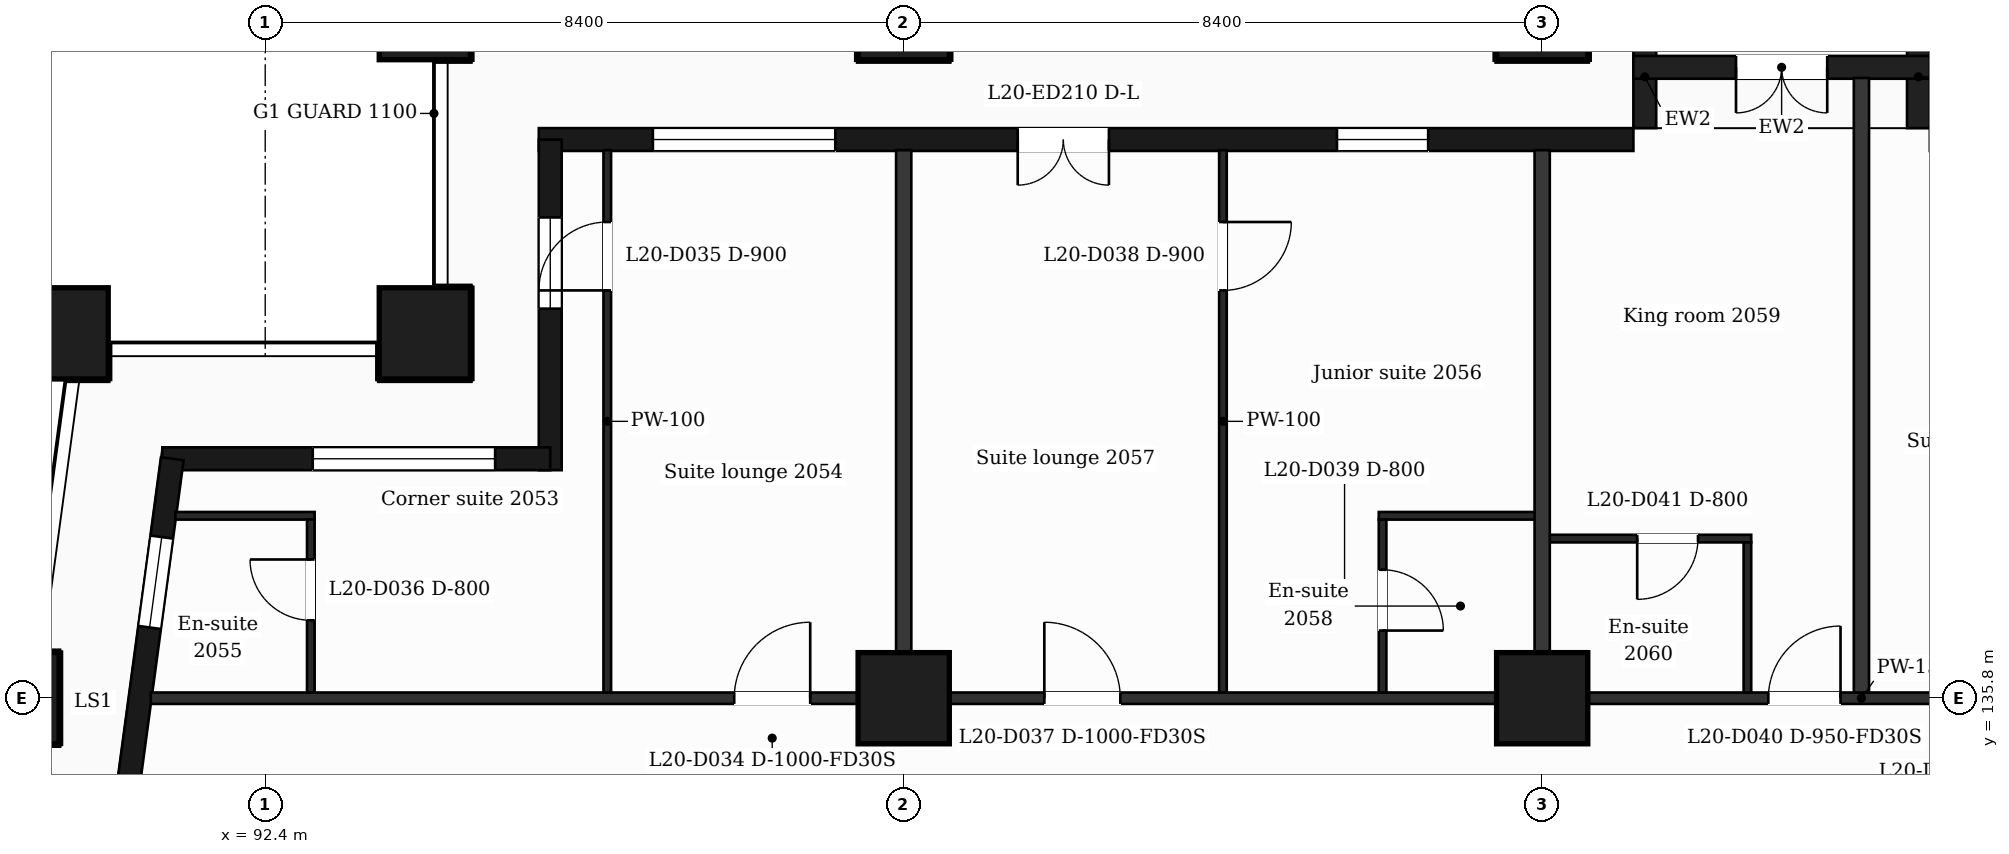
"""IFC4 building model, lengths in metres.
Left out: names, types, materials, properties, quantities, classifications, styles, units other than length and angle.
Written with IfcOpenShell. Run it as: python <this file> out.ifc"""

import sys

from ifc_helpers import new_model, si_unit, direction, frame, frame_2d, origin, origin_2d, place, context, subcontext, project, spatial, rectangle, extrude, element, fill, save


model = new_model("IFC4")
c1 = context("Model", 3, precision=1e-05, world=origin(), true_north=direction((0.0, 1.0)))
c2 = subcontext(c1, "Body", "Model", "MODEL_VIEW")
j1 = project(units=[si_unit("LENGTHUNIT", "METRE"), si_unit("PLANEANGLEUNIT", "RADIAN")], contexts=[c1])
p1 = place(None, origin())
s1 = spatial("IfcSite", under=j1, at=p1, CompositionType="ELEMENT")
p2 = place(p1, origin())
s2 = spatial("IfcBuilding", under=s1, at=p2, CompositionType="ELEMENT")
p3 = place(p2, frame((0.0, 0.0, 91.0)))
s3 = spatial("IfcBuildingStorey", under=s2, at=p3, CompositionType="ELEMENT", Elevation=91.0)
for number, where, z_axis, x_axis in (
    (1, (94.5, 140.6, 0.0), (0.0, 0.0, 1.0), (1.0, 0.0, 0.0)),
    (2, (89.735, 140.6, 0.0), (0.0, 0.0, 1.0), (1.0, 0.0, 0.0)),
    (3, (100.8, 135.8, 0.0), (0.0, 0.0, 1.0), (1.0, 0.0, 0.0)),
    (4, (109.2, 135.8, 0.0), (0.0, 0.0, 1.0), (1.0, 0.0, 0.0)),
    (5, (89.088, 135.8, 0.0), (0.0, 0.0, 1.0), (1.0, 0.0, 0.0)),
    (6, (100.8, 144.8, 0.0), (0.0, 0.0, 1.0), (1.0, 0.0, 0.0)),
    (7, (109.2, 144.8, 0.0), (0.0, 0.0, 1.0), (1.0, 0.0, 0.0)),
    (8, (94.5, 144.8, 0.0), (0.0, 0.0, 1.0), (1.0, 0.0, 0.0)),
):
    element("IfcColumn", number, at=place(p3, frame(where, z_axis=z_axis, x_axis=x_axis)), inside=s3, PredefinedType="COLUMN", context=c2, shape_type="SweptSolid", body=[
        extrude(rectangle(XDim=1.2, YDim=1.2, at=origin_2d()), origin(), (0.0, 0.0, 1.0), 3.7),
    ])
p4 = place(p3, frame((110.4, 143.15, 0.0), z_axis=(0.0, 0.0, 1.0), x_axis=(-1.0, 0.0, 0.0)))
e9 = element("IfcWall", 9, at=p4, inside=s3, PredefinedType="SOLIDWALL", context=c2, shape_type="SweptSolid", body=[
    extrude(rectangle(XDim=14.4, YDim=0.3, at=frame_2d((7.2, 0.0))), origin(), (0.0, 0.0, 1.0), 3.38),
])
p5 = place(p4, frame((2.7, 0.0, 0.9)))
e10 = element("IfcOpeningElement", 10, at=p5, cuts=e9, PredefinedType="OPENING", context=c2, shape_type="SweptSolid", body=[
    extrude(rectangle(XDim=1.2, YDim=2.1, at=frame_2d((0.6, 1.05))), frame((0.0, 0.16, 0.0), z_axis=(0.0, -1.0, 0.0), x_axis=(1.0, 0.0, 0.0)), (0.0, 0.0, 1.0), 0.32),
])
p6 = place(p4, frame((6.9, 0.0, 0.0)))
e11 = element("IfcOpeningElement", 11, at=p6, cuts=e9, PredefinedType="OPENING", context=c2, shape_type="SweptSolid", body=[
    extrude(rectangle(XDim=1.2, YDim=2.4, at=frame_2d((0.6, 1.2))), frame((0.0, 0.16, 0.0), z_axis=(0.0, -1.0, 0.0), x_axis=(1.0, 0.0, 0.0)), (0.0, 0.0, 1.0), 0.32),
])
p7 = place(p4, frame((10.5, 0.0, 0.9)))
e12 = element("IfcOpeningElement", 12, at=p7, cuts=e9, PredefinedType="OPENING", context=c2, shape_type="SweptSolid", body=[
    extrude(rectangle(XDim=2.4, YDim=2.1, at=frame_2d((1.2, 1.05))), frame((0.0, 0.16, 0.0), z_axis=(0.0, -1.0, 0.0), x_axis=(1.0, 0.0, 0.0)), (0.0, 0.0, 1.0), 0.32),
])
for number, where, z_axis, x_axis in (
    (13, (114.15, 143.3, 0.0), (0.0, 0.0, 1.0), (0.0, 1.0, 0.0)),
    (14, (110.55, 143.3, 0.0), (0.0, 0.0, 1.0), (0.0, 1.0, 0.0)),
):
    element("IfcWall", number, at=place(p3, frame(where, z_axis=z_axis, x_axis=x_axis)), inside=s3, PredefinedType="SOLIDWALL", context=c2, shape_type="SweptSolid", body=[
        extrude(rectangle(XDim=1.35, YDim=0.3, at=frame_2d((0.675, 0.0))), origin(), (0.0, 0.0, 1.0), 3.38),
    ])
p8 = place(p3, frame((114.3, 144.1, 0.0), z_axis=(0.0, 0.0, 1.0), x_axis=(-1.0, 0.0, 0.0)))
e15 = element("IfcWall", 15, at=p8, inside=s3, PredefinedType="SOLIDWALL", context=c2, shape_type="SweptSolid", body=[
    extrude(rectangle(XDim=3.9, YDim=0.3, at=frame_2d((1.95, 0.0))), origin(), (0.0, 0.0, 1.0), 3.38),
])
p9 = place(p8, frame((1.35, 0.0, 0.0)))
e16 = element("IfcOpeningElement", 16, at=p9, cuts=e15, PredefinedType="OPENING", context=c2, shape_type="SweptSolid", body=[
    extrude(rectangle(XDim=1.2, YDim=2.4, at=frame_2d((0.6, 1.2))), frame((0.0, 0.16, 0.0), z_axis=(0.0, -1.0, 0.0), x_axis=(1.0, 0.0, 0.0)), (0.0, 0.0, 1.0), 0.32),
])
p10 = place(p3, frame((96.15, 143.15, 0.0), z_axis=(0.0, 0.0, 1.0), x_axis=(0.0, -1.0, 0.0)))
e17 = element("IfcWall", 17, at=p10, inside=s3, PredefinedType="SOLIDWALL", context=c2, shape_type="SweptSolid", body=[
    extrude(rectangle(XDim=4.35, YDim=0.3, at=frame_2d((2.175, 0.0))), origin(), (0.0, 0.0, 1.0), 3.38),
])
p11 = place(p10, frame((1.025, 0.0, 0.9)))
e18 = element("IfcOpeningElement", 18, at=p11, cuts=e17, PredefinedType="OPENING", context=c2, shape_type="SweptSolid", body=[
    extrude(rectangle(XDim=1.2, YDim=2.1, at=frame_2d((0.6, 1.05))), frame((0.0, 0.16, 0.0), z_axis=(0.0, -1.0, 0.0), x_axis=(1.0, 0.0, 0.0)), (0.0, 0.0, 1.0), 0.32),
])
p12 = place(p3, frame((96.15, 138.95, 0.0), z_axis=(0.0, 0.0, 1.0), x_axis=(-1.0, 0.0, 0.0)))
e19 = element("IfcWall", 19, at=p12, inside=s3, PredefinedType="SOLIDWALL", context=c2, shape_type="SweptSolid", body=[
    extrude(rectangle(XDim=5.104, YDim=0.3, at=frame_2d((2.552, 0.0))), origin(), (0.0, 0.0, 1.0), 3.38),
])
p13 = place(p12, frame((0.725, 0.0, 0.9)))
e20 = element("IfcOpeningElement", 20, at=p13, cuts=e19, PredefinedType="OPENING", context=c2, shape_type="SweptSolid", body=[
    extrude(rectangle(XDim=2.4, YDim=2.1, at=frame_2d((1.2, 1.05))), frame((0.0, 0.16, 0.0), z_axis=(0.0, -1.0, 0.0), x_axis=(1.0, 0.0, 0.0)), (0.0, 0.0, 1.0), 0.32),
])
p14 = place(p3, frame((91.177, 138.95, 0.0), z_axis=(0.0, 0.0, 1.0), x_axis=(-0.133426664613, -0.991058689065, 0.0)))
e21 = element("IfcWall", 21, at=p14, inside=s3, PredefinedType="SOLIDWALL", context=c2, shape_type="SweptSolid", body=[
    extrude(rectangle(XDim=6.609, YDim=0.3, at=frame_2d((3.305, 0.0))), origin(), (0.0, 0.0, 1.0), 3.38),
])
p15 = place(p14, frame((1.039, 0.0, 0.9)))
e22 = element("IfcOpeningElement", 22, at=p15, cuts=e21, PredefinedType="OPENING", context=c2, shape_type="SweptSolid", body=[
    extrude(rectangle(XDim=1.2, YDim=2.1, at=frame_2d((0.6, 1.05))), frame((0.0, 0.16, 0.0), z_axis=(0.0, -1.0, 0.0), x_axis=(1.0, 0.0, 0.0)), (0.0, 0.0, 1.0), 0.32),
])
p16 = place(p14, frame((4.294, 0.0, 0.0)))
e23 = element("IfcOpeningElement", 23, at=p16, cuts=e21, PredefinedType="OPENING", context=c2, shape_type="SweptSolid", body=[
    extrude(rectangle(XDim=1.2, YDim=2.4, at=frame_2d((0.6, 1.2))), frame((0.0, 0.16, 0.0), z_axis=(0.0, -1.0, 0.0), x_axis=(1.0, 0.0, 0.0)), (0.0, 0.0, 1.0), 0.32),
])
p17 = place(p3, frame((90.895, 135.8, 0.0), z_axis=(0.0, 0.0, 1.0), x_axis=(1.0, 0.0, 0.0)))
e24 = element("IfcWall", 24, at=p17, inside=s3, PredefinedType="PARTITIONING", context=c2, shape_type="SweptSolid", body=[
    extrude(rectangle(XDim=45.011, YDim=0.15, at=frame_2d((22.505, 0.0))), origin(), (0.0, 0.0, 1.0), 3.38),
])
p18 = place(p17, frame((7.675, 0.0, 0.0)))
e25 = element("IfcOpeningElement", 25, at=p18, cuts=e24, PredefinedType="OPENING", context=c2, shape_type="SweptSolid", body=[
    extrude(rectangle(XDim=1.0, YDim=2.1, at=frame_2d((0.5, 1.05))), frame((0.0, 0.085, 0.0), z_axis=(0.0, -1.0, 0.0), x_axis=(1.0, 0.0, 0.0)), (0.0, 0.0, 1.0), 0.17),
])
p19 = place(p17, frame((11.755, 0.0, 0.0)))
e26 = element("IfcOpeningElement", 26, at=p19, cuts=e24, PredefinedType="OPENING", context=c2, shape_type="SweptSolid", body=[
    extrude(rectangle(XDim=1.0, YDim=2.1, at=frame_2d((0.5, 1.05))), frame((0.0, 0.085, 0.0), z_axis=(0.0, -1.0, 0.0), x_axis=(1.0, 0.0, 0.0)), (0.0, 0.0, 1.0), 0.17),
])
p20 = place(p17, frame((21.281, 0.0, 0.0)))
e27 = element("IfcOpeningElement", 27, at=p20, cuts=e24, PredefinedType="OPENING", context=c2, shape_type="SweptSolid", body=[
    extrude(rectangle(XDim=0.95, YDim=2.1, at=frame_2d((0.475, 1.05))), frame((0.0, 0.085, 0.0), z_axis=(0.0, -1.0, 0.0), x_axis=(1.0, 0.0, 0.0)), (0.0, 0.0, 1.0), 0.17),
])
p21 = place(p17, frame((23.855, 0.0, 0.0)))
e28 = element("IfcOpeningElement", 28, at=p21, cuts=e24, PredefinedType="OPENING", context=c2, shape_type="SweptSolid", body=[
    extrude(rectangle(XDim=1.0, YDim=2.1, at=frame_2d((0.5, 1.05))), frame((0.0, 0.085, 0.0), z_axis=(0.0, -1.0, 0.0), x_axis=(1.0, 0.0, 0.0)), (0.0, 0.0, 1.0), 0.17),
])
p22 = place(p17, frame((33.285, 0.0, 0.0)))
e29 = element("IfcOpeningElement", 29, at=p22, cuts=e24, PredefinedType="OPENING", context=c2, shape_type="SweptSolid", body=[
    extrude(rectangle(XDim=1.0, YDim=2.1, at=frame_2d((0.5, 1.05))), frame((0.0, 0.085, 0.0), z_axis=(0.0, -1.0, 0.0), x_axis=(1.0, 0.0, 0.0)), (0.0, 0.0, 1.0), 0.17),
])
p23 = place(p17, frame((39.814, 0.0, 0.0)))
e30 = element("IfcOpeningElement", 30, at=p23, cuts=e24, PredefinedType="OPENING", context=c2, shape_type="SweptSolid", body=[
    extrude(rectangle(XDim=0.95, YDim=2.1, at=frame_2d((0.475, 1.05))), frame((0.0, 0.085, 0.0), z_axis=(0.0, -1.0, 0.0), x_axis=(1.0, 0.0, 0.0)), (0.0, 0.0, 1.0), 0.17),
])
p24 = place(p3, frame((109.2, 137.9, 0.0), z_axis=(0.0, 0.0, 1.0), x_axis=(1.0, 0.0, 0.0)))
e31 = element("IfcWall", 31, at=p24, inside=s3, PredefinedType="PARTITIONING", context=c2, shape_type="SweptSolid", body=[
    extrude(rectangle(XDim=2.75, YDim=0.1, at=frame_2d((1.375, 0.0))), origin(), (0.0, 0.0, 1.0), 3.38),
])
p25 = place(p24, frame((1.25, 0.0, 0.0)))
e32 = element("IfcOpeningElement", 32, at=p25, cuts=e31, PredefinedType="OPENING", context=c2, shape_type="SweptSolid", body=[
    extrude(rectangle(XDim=0.8, YDim=2.1, at=frame_2d((0.4, 1.05))), frame((0.0, 0.06, 0.0), z_axis=(0.0, -1.0, 0.0), x_axis=(1.0, 0.0, 0.0)), (0.0, 0.0, 1.0), 0.12),
])
p26 = place(p3, frame((91.218, 138.2, 0.0), z_axis=(0.0, 0.0, 1.0), x_axis=(1.0, 0.0, 0.0)))
e33 = element("IfcWall", 33, at=p26, inside=s3, PredefinedType="PARTITIONING", context=c2, shape_type="SweptSolid", body=[
    extrude(rectangle(XDim=1.832, YDim=0.1, at=frame_2d((0.916, 0.0))), origin(), (0.0, 0.0, 1.0), 3.38),
])
p27 = place(p3, frame((107.05, 138.2, 0.0), z_axis=(0.0, 0.0, 1.0), x_axis=(1.0, 0.0, 0.0)))
e34 = element("IfcWall", 34, at=p27, inside=s3, PredefinedType="PARTITIONING", context=c2, shape_type="SweptSolid", body=[
    extrude(rectangle(XDim=2.15, YDim=0.1, at=frame_2d((1.075, 0.0))), origin(), (0.0, 0.0, 1.0), 3.38),
])
p28 = place(p3, frame((93.0, 135.875, 0.0), z_axis=(0.0, 0.0, 1.0), x_axis=(0.0, 1.0, 0.0)))
e35 = element("IfcWall", 35, at=p28, inside=s3, PredefinedType="PARTITIONING", context=c2, shape_type="SweptSolid", body=[
    extrude(rectangle(XDim=2.275, YDim=0.1, at=frame_2d((1.137, 0.0))), origin(), (0.0, 0.0, 1.0), 3.38),
])
p29 = place(p28, frame((0.95, 0.0, 0.0)))
e36 = element("IfcOpeningElement", 36, at=p29, cuts=e35, PredefinedType="OPENING", context=c2, shape_type="SweptSolid", body=[
    extrude(rectangle(XDim=0.8, YDim=2.1, at=frame_2d((0.4, 1.05))), frame((0.0, 0.06, 0.0), z_axis=(0.0, -1.0, 0.0), x_axis=(1.0, 0.0, 0.0)), (0.0, 0.0, 1.0), 0.12),
])
p30 = place(p3, frame((96.9, 135.875, 0.0), z_axis=(0.0, 0.0, 1.0), x_axis=(0.0, 1.0, 0.0)))
e37 = element("IfcWall", 37, at=p30, inside=s3, PredefinedType="PARTITIONING", context=c2, shape_type="SweptSolid", body=[
    extrude(rectangle(XDim=7.135, YDim=0.1, at=frame_2d((3.567, 0.0))), origin(), (0.0, 0.0, 1.0), 3.38),
])
p31 = place(p30, frame((5.29, 0.0, 0.0)))
e38 = element("IfcOpeningElement", 38, at=p31, cuts=e37, PredefinedType="OPENING", context=c2, shape_type="SweptSolid", body=[
    extrude(rectangle(XDim=0.9, YDim=2.1, at=frame_2d((0.45, 1.05))), frame((0.0, 0.06, 0.0), z_axis=(0.0, -1.0, 0.0), x_axis=(1.0, 0.0, 0.0)), (0.0, 0.0, 1.0), 0.12),
])
p32 = place(p3, frame((100.8, 135.875, 0.0), z_axis=(0.0, 0.0, 1.0), x_axis=(0.0, 1.0, 0.0)))
e39 = element("IfcWall", 39, at=p32, inside=s3, PredefinedType="PARTITIONING", context=c2, shape_type="SweptSolid", body=[
    extrude(rectangle(XDim=7.135, YDim=0.2, at=frame_2d((3.567, 0.0))), origin(), (0.0, 0.0, 1.0), 3.38),
])
p33 = place(p3, frame((105.0, 135.875, 0.0), z_axis=(0.0, 0.0, 1.0), x_axis=(0.0, 1.0, 0.0)))
e40 = element("IfcWall", 40, at=p33, inside=s3, PredefinedType="PARTITIONING", context=c2, shape_type="SweptSolid", body=[
    extrude(rectangle(XDim=7.135, YDim=0.1, at=frame_2d((3.567, 0.0))), origin(), (0.0, 0.0, 1.0), 3.38),
])
p34 = place(p33, frame((5.29, 0.0, 0.0)))
e41 = element("IfcOpeningElement", 41, at=p34, cuts=e40, PredefinedType="OPENING", context=c2, shape_type="SweptSolid", body=[
    extrude(rectangle(XDim=0.9, YDim=2.1, at=frame_2d((0.45, 1.05))), frame((0.0, 0.06, 0.0), z_axis=(0.0, -1.0, 0.0), x_axis=(1.0, 0.0, 0.0)), (0.0, 0.0, 1.0), 0.12),
])
p35 = place(p3, frame((107.1, 135.875, 0.0), z_axis=(0.0, 0.0, 1.0), x_axis=(0.0, 1.0, 0.0)))
e42 = element("IfcWall", 42, at=p35, inside=s3, PredefinedType="PARTITIONING", context=c2, shape_type="SweptSolid", body=[
    extrude(rectangle(XDim=2.275, YDim=0.1, at=frame_2d((1.137, 0.0))), origin(), (0.0, 0.0, 1.0), 3.38),
])
p36 = place(p35, frame((0.815, 0.0, 0.0)))
e43 = element("IfcOpeningElement", 43, at=p36, cuts=e42, PredefinedType="OPENING", context=c2, shape_type="SweptSolid", body=[
    extrude(rectangle(XDim=0.8, YDim=2.1, at=frame_2d((0.4, 1.05))), frame((0.0, 0.06, 0.0), z_axis=(0.0, -1.0, 0.0), x_axis=(1.0, 0.0, 0.0)), (0.0, 0.0, 1.0), 0.12),
])
p37 = place(p3, frame((109.2, 135.875, 0.0), z_axis=(0.0, 0.0, 1.0), x_axis=(0.0, 1.0, 0.0)))
e44 = element("IfcWall", 44, at=p37, inside=s3, PredefinedType="PARTITIONING", context=c2, shape_type="SweptSolid", body=[
    extrude(rectangle(XDim=7.135, YDim=0.2, at=frame_2d((3.567, 0.0))), origin(), (0.0, 0.0, 1.0), 3.38),
])
p38 = place(p3, frame((111.9, 135.875, 0.0), z_axis=(0.0, 0.0, 1.0), x_axis=(0.0, 1.0, 0.0)))
e45 = element("IfcWall", 45, at=p38, inside=s3, PredefinedType="PARTITIONING", context=c2, shape_type="SweptSolid", body=[
    extrude(rectangle(XDim=1.975, YDim=0.1, at=frame_2d((0.988, 0.0))), origin(), (0.0, 0.0, 1.0), 3.38),
])
p39 = place(p3, frame((113.4, 135.875, 0.0), z_axis=(0.0, 0.0, 1.0), x_axis=(0.0, 1.0, 0.0)))
e46 = element("IfcWall", 46, at=p39, inside=s3, PredefinedType="PARTITIONING", context=c2, shape_type="SweptSolid", body=[
    extrude(rectangle(XDim=8.085, YDim=0.2, at=frame_2d((4.042, 0.0))), origin(), (0.0, 0.0, 1.0), 3.38),
])
p40 = place(p5, origin())
e47 = element("IfcWindow", 47, at=p40, inside=s3, PartitioningType="SINGLE_PANEL", PredefinedType="WINDOW", context=c2, shape_type="SweptSolid", body=[
    extrude(rectangle(XDim=1.2, YDim=2.1, at=frame_2d((0.6, 1.05))), frame((0.0, 0.03, 0.0), z_axis=(0.0, -1.0, 0.0), x_axis=(1.0, 0.0, 0.0)), (0.0, 0.0, 1.0), 0.06),
])
fill(e10, e47)
p41 = place(p6, origin())
e48 = element("IfcDoor", 48, at=p41, inside=s3, OperationType="DOUBLE_DOOR_SINGLE_SWING", PredefinedType="DOOR", context=c2, shape_type="SweptSolid", body=[
    extrude(rectangle(XDim=1.2, YDim=2.4, at=frame_2d((0.6, 1.2))), frame((0.0, 0.025, 0.0), z_axis=(0.0, -1.0, 0.0), x_axis=(1.0, 0.0, 0.0)), (0.0, 0.0, 1.0), 0.05),
])
fill(e11, e48)
p42 = place(p7, origin())
e49 = element("IfcWindow", 49, at=p42, inside=s3, PartitioningType="SINGLE_PANEL", PredefinedType="WINDOW", context=c2, shape_type="SweptSolid", body=[
    extrude(rectangle(XDim=2.4, YDim=2.1, at=frame_2d((1.2, 1.05))), frame((0.0, 0.03, 0.0), z_axis=(0.0, -1.0, 0.0), x_axis=(1.0, 0.0, 0.0)), (0.0, 0.0, 1.0), 0.06),
])
fill(e12, e49)
p43 = place(p9, origin())
e50 = element("IfcDoor", 50, at=p43, inside=s3, OperationType="DOUBLE_DOOR_SINGLE_SWING", PredefinedType="DOOR", context=c2, shape_type="SweptSolid", body=[
    extrude(rectangle(XDim=1.2, YDim=2.4, at=frame_2d((0.6, 1.2))), frame((0.0, 0.025, 0.0), z_axis=(0.0, -1.0, 0.0), x_axis=(1.0, 0.0, 0.0)), (0.0, 0.0, 1.0), 0.05),
])
fill(e16, e50)
p44 = place(p11, origin())
e51 = element("IfcWindow", 51, at=p44, inside=s3, PartitioningType="SINGLE_PANEL", PredefinedType="WINDOW", context=c2, shape_type="SweptSolid", body=[
    extrude(rectangle(XDim=1.2, YDim=2.1, at=frame_2d((0.6, 1.05))), frame((0.0, 0.03, 0.0), z_axis=(0.0, -1.0, 0.0), x_axis=(1.0, 0.0, 0.0)), (0.0, 0.0, 1.0), 0.06),
])
fill(e18, e51)
p45 = place(p13, origin())
e52 = element("IfcWindow", 52, at=p45, inside=s3, PartitioningType="SINGLE_PANEL", PredefinedType="WINDOW", context=c2, shape_type="SweptSolid", body=[
    extrude(rectangle(XDim=2.4, YDim=2.1, at=frame_2d((1.2, 1.05))), frame((0.0, 0.03, 0.0), z_axis=(0.0, -1.0, 0.0), x_axis=(1.0, 0.0, 0.0)), (0.0, 0.0, 1.0), 0.06),
])
fill(e20, e52)
p46 = place(p15, origin())
e53 = element("IfcWindow", 53, at=p46, inside=s3, PartitioningType="SINGLE_PANEL", PredefinedType="WINDOW", context=c2, shape_type="SweptSolid", body=[
    extrude(rectangle(XDim=1.2, YDim=2.1, at=frame_2d((0.6, 1.05))), frame((0.0, 0.03, 0.0), z_axis=(0.0, -1.0, 0.0), x_axis=(1.0, 0.0, 0.0)), (0.0, 0.0, 1.0), 0.06),
])
fill(e22, e53)
p47 = place(p18, origin())
e54 = element("IfcDoor", 54, at=p47, inside=s3, OperationType="SINGLE_SWING_RIGHT", PredefinedType="DOOR", context=c2, shape_type="SweptSolid", body=[
    extrude(rectangle(XDim=1.0, YDim=2.1, at=frame_2d((0.5, 1.05))), frame((0.0, 0.025, 0.0), z_axis=(0.0, -1.0, 0.0), x_axis=(1.0, 0.0, 0.0)), (0.0, 0.0, 1.0), 0.05),
])
fill(e25, e54)
p48 = place(p31, origin())
e55 = element("IfcDoor", 55, at=p48, inside=s3, OperationType="SINGLE_SWING_LEFT", PredefinedType="DOOR", context=c2, shape_type="SweptSolid", body=[
    extrude(rectangle(XDim=0.9, YDim=2.1, at=frame_2d((0.45, 1.05))), frame((0.0, 0.025, 0.0), z_axis=(0.0, -1.0, 0.0), x_axis=(1.0, 0.0, 0.0)), (0.0, 0.0, 1.0), 0.05),
])
fill(e38, e55)
p49 = place(p29, origin())
e56 = element("IfcDoor", 56, at=p49, inside=s3, OperationType="SINGLE_SWING_RIGHT", PredefinedType="DOOR", context=c2, shape_type="SweptSolid", body=[
    extrude(rectangle(XDim=0.8, YDim=2.1, at=frame_2d((0.4, 1.05))), frame((0.0, 0.025, 0.0), z_axis=(0.0, -1.0, 0.0), x_axis=(1.0, 0.0, 0.0)), (0.0, 0.0, 1.0), 0.05),
])
fill(e36, e56)
p50 = place(p19, origin())
e57 = element("IfcDoor", 57, at=p50, inside=s3, OperationType="SINGLE_SWING_LEFT", PredefinedType="DOOR", context=c2, shape_type="SweptSolid", body=[
    extrude(rectangle(XDim=1.0, YDim=2.1, at=frame_2d((0.5, 1.05))), frame((0.0, 0.025, 0.0), z_axis=(0.0, -1.0, 0.0), x_axis=(1.0, 0.0, 0.0)), (0.0, 0.0, 1.0), 0.05),
])
fill(e26, e57)
p51 = place(p34, origin())
e58 = element("IfcDoor", 58, at=p51, inside=s3, OperationType="SINGLE_SWING_RIGHT", PredefinedType="DOOR", context=c2, shape_type="SweptSolid", body=[
    extrude(rectangle(XDim=0.9, YDim=2.1, at=frame_2d((0.45, 1.05))), frame((0.0, 0.025, 0.0), z_axis=(0.0, -1.0, 0.0), x_axis=(1.0, 0.0, 0.0)), (0.0, 0.0, 1.0), 0.05),
])
fill(e41, e58)
p52 = place(p36, origin())
e59 = element("IfcDoor", 59, at=p52, inside=s3, OperationType="SINGLE_SWING_LEFT", PredefinedType="DOOR", context=c2, shape_type="SweptSolid", body=[
    extrude(rectangle(XDim=0.8, YDim=2.1, at=frame_2d((0.4, 1.05))), frame((0.0, 0.025, 0.0), z_axis=(0.0, -1.0, 0.0), x_axis=(1.0, 0.0, 0.0)), (0.0, 0.0, 1.0), 0.05),
])
fill(e43, e59)
p53 = place(p20, origin())
e60 = element("IfcDoor", 60, at=p53, inside=s3, OperationType="SINGLE_SWING_RIGHT", PredefinedType="DOOR", context=c2, shape_type="SweptSolid", body=[
    extrude(rectangle(XDim=0.95, YDim=2.1, at=frame_2d((0.475, 1.05))), frame((0.0, 0.025, 0.0), z_axis=(0.0, -1.0, 0.0), x_axis=(1.0, 0.0, 0.0)), (0.0, 0.0, 1.0), 0.05),
])
fill(e27, e60)
p54 = place(p25, origin())
e61 = element("IfcDoor", 61, at=p54, inside=s3, OperationType="SINGLE_SWING_LEFT", PredefinedType="DOOR", context=c2, shape_type="SweptSolid", body=[
    extrude(rectangle(XDim=0.8, YDim=2.1, at=frame_2d((0.4, 1.05))), frame((0.0, 0.025, 0.0), z_axis=(0.0, -1.0, 0.0), x_axis=(1.0, 0.0, 0.0)), (0.0, 0.0, 1.0), 0.05),
])
fill(e32, e61)
save(model, sys.argv[1])
